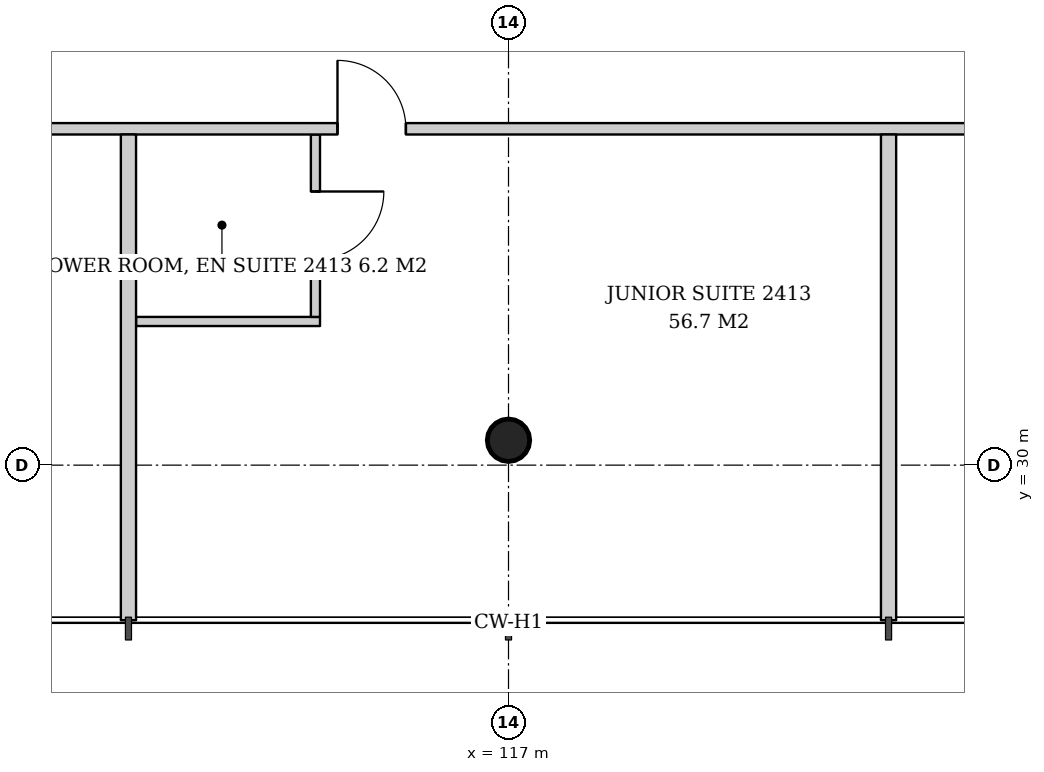
"""IFC4 building model, lengths in metres.
Left out: names, types, materials, properties, quantities, classifications, styles, units other than length and angle.
Written with IfcOpenShell. Run it as: python <this file> out.ifc"""

import sys

from ifc_helpers import new_model, si_unit, direction, frame, frame_2d, origin, origin_2d, place, context, subcontext, project, spatial, rectangle, hollow_circle, extrude, element, fill, save


model = new_model("IFC4")
c1 = context("Model", 3, precision=1e-05, world=origin(), true_north=direction((0.0, 1.0)))
c2 = subcontext(c1, "Body", "Model", "MODEL_VIEW")
j1 = project(units=[si_unit("LENGTHUNIT", "METRE"), si_unit("PLANEANGLEUNIT", "RADIAN")], contexts=[c1])
p1 = place(None, origin())
s1 = spatial("IfcSite", under=j1, at=p1, CompositionType="ELEMENT")
p2 = place(p1, origin())
s2 = spatial("IfcBuilding", under=s1, at=p2, CompositionType="ELEMENT")
p3 = place(p2, frame((0.0, 0.0, 97.0)))
s3 = spatial("IfcBuildingStorey", under=s2, at=p3, CompositionType="ELEMENT", Elevation=97.0)
p4 = place(p3, frame((117.0, 30.276, 0.0), z_axis=(0.0, 0.043069538298, 0.999072076915), x_axis=(-1.0, 0.0, 0.0)))
e1 = element("IfcColumn", 1, at=p4, inside=s3, PredefinedType="COLUMN", context=c2, shape_type="SweptSolid", body=[
    extrude(hollow_circle(Radius=0.28, WallThickness=0.02, at=origin_2d()), origin(), (0.0, 0.0, 1.0), 3.803),
])
p5 = place(p3, frame((112.1, 31.89, 0.0), z_axis=(0.0, 0.0, 1.0), x_axis=(1.0, 0.0, 0.0)))
e2 = element("IfcWall", 2, at=p5, inside=s3, PredefinedType="PARTITIONING", context=c2, shape_type="SweptSolid", body=[
    extrude(rectangle(XDim=2.42, YDim=0.12, at=frame_2d((1.21, 0.0))), origin(), (0.0, 0.0, 1.0), 3.6),
])
p6 = place(p3, frame((114.46, 34.35, 0.0), z_axis=(0.0, 0.0, 1.0), x_axis=(0.0, -1.0, 0.0)))
e3 = element("IfcWall", 3, at=p6, inside=s3, PredefinedType="PARTITIONING", context=c2, shape_type="SweptSolid", body=[
    extrude(rectangle(XDim=2.4, YDim=0.12, at=frame_2d((1.2, 0.0))), origin(), (0.0, 0.0, 1.0), 3.6),
])
p7 = place(p6, frame((0.75, 0.0, 0.0)))
e4 = element("IfcOpeningElement", 4, at=p7, cuts=e3, PredefinedType="OPENING", context=c2, shape_type="SweptSolid", body=[
    extrude(rectangle(XDim=0.9, YDim=2.1, at=frame_2d((0.45, 1.05))), frame((0.0, 0.07, 0.0), z_axis=(0.0, -1.0, 0.0), x_axis=(1.0, 0.0, 0.0)), (0.0, 0.0, 1.0), 0.14),
])
p8 = place(p3, frame((105.236, 34.425, 0.0), z_axis=(0.0, 0.0, 1.0), x_axis=(1.0, 0.0, 0.0)))
e5 = element("IfcWall", 5, at=p8, inside=s3, PredefinedType="PARTITIONING", context=c2, shape_type="SweptSolid", body=[
    extrude(rectangle(XDim=23.527, YDim=0.15, at=frame_2d((11.764, 0.0))), origin(), (0.0, 0.0, 1.0), 2.9),
])
p9 = place(p8, frame((0.514, 0.0, 0.0)))
e6 = element("IfcOpeningElement", 6, at=p9, cuts=e5, PredefinedType="OPENING", context=c2, shape_type="SweptSolid", body=[
    extrude(rectangle(XDim=0.9, YDim=2.1, at=frame_2d((0.45, 1.05))), frame((0.0, 0.085, 0.0), z_axis=(0.0, -1.0, 0.0), x_axis=(1.0, 0.0, 0.0)), (0.0, 0.0, 1.0), 0.17),
])
p10 = place(p8, frame((9.514, 0.0, 0.0)))
e7 = element("IfcOpeningElement", 7, at=p10, cuts=e5, PredefinedType="OPENING", context=c2, shape_type="SweptSolid", body=[
    extrude(rectangle(XDim=0.9, YDim=2.1, at=frame_2d((0.45, 1.05))), frame((0.0, 0.085, 0.0), z_axis=(0.0, -1.0, 0.0), x_axis=(1.0, 0.0, 0.0)), (0.0, 0.0, 1.0), 0.17),
])
p11 = place(p8, frame((19.464, 0.0, 0.0)))
e8 = element("IfcOpeningElement", 8, at=p11, cuts=e5, PredefinedType="OPENING", context=c2, shape_type="SweptSolid", body=[
    extrude(rectangle(XDim=1.0, YDim=2.1, at=frame_2d((0.5, 1.05))), frame((0.0, 0.085, 0.0), z_axis=(0.0, -1.0, 0.0), x_axis=(1.0, 0.0, 0.0)), (0.0, 0.0, 1.0), 0.17),
])
p12 = place(p3, frame((112.0, 34.35, 0.0), z_axis=(0.0, 0.0, 1.0), x_axis=(0.0, -1.0, 0.0)))
e9 = element("IfcWall", 9, at=p12, inside=s3, PredefinedType="PARTITIONING", context=c2, shape_type="SweptSolid", body=[
    extrude(rectangle(XDim=6.39, YDim=0.2, at=frame_2d((3.195, 0.0))), origin(), (0.0, 0.0, 1.0), 3.0),
])
p13 = place(p3, frame((122.0, 34.35, 0.0), z_axis=(0.0, 0.0, 1.0), x_axis=(0.0, -1.0, 0.0)))
e10 = element("IfcWall", 10, at=p13, inside=s3, PredefinedType="PARTITIONING", context=c2, shape_type="SweptSolid", body=[
    extrude(rectangle(XDim=6.39, YDim=0.2, at=frame_2d((3.195, 0.0))), origin(), (0.0, 0.0, 1.0), 3.2),
])
p14 = place(p7, origin())
e11 = element("IfcDoor", 11, at=p14, inside=s3, OperationType="SINGLE_SWING_LEFT", PredefinedType="DOOR", context=c2, shape_type="SweptSolid", body=[
    extrude(rectangle(XDim=0.9, YDim=2.1, at=frame_2d((0.45, 1.05))), frame((0.0, 0.025, 0.0), z_axis=(0.0, -1.0, 0.0), x_axis=(1.0, 0.0, 0.0)), (0.0, 0.0, 1.0), 0.05),
])
fill(e4, e11)
p15 = place(p10, origin())
e12 = element("IfcDoor", 12, at=p15, inside=s3, OperationType="SINGLE_SWING_LEFT", PredefinedType="DOOR", context=c2, shape_type="SweptSolid", body=[
    extrude(rectangle(XDim=0.9, YDim=2.1, at=frame_2d((0.45, 1.05))), frame((0.0, 0.025, 0.0), z_axis=(0.0, -1.0, 0.0), x_axis=(1.0, 0.0, 0.0)), (0.0, 0.0, 1.0), 0.05),
])
fill(e7, e12)
save(model, sys.argv[1])
